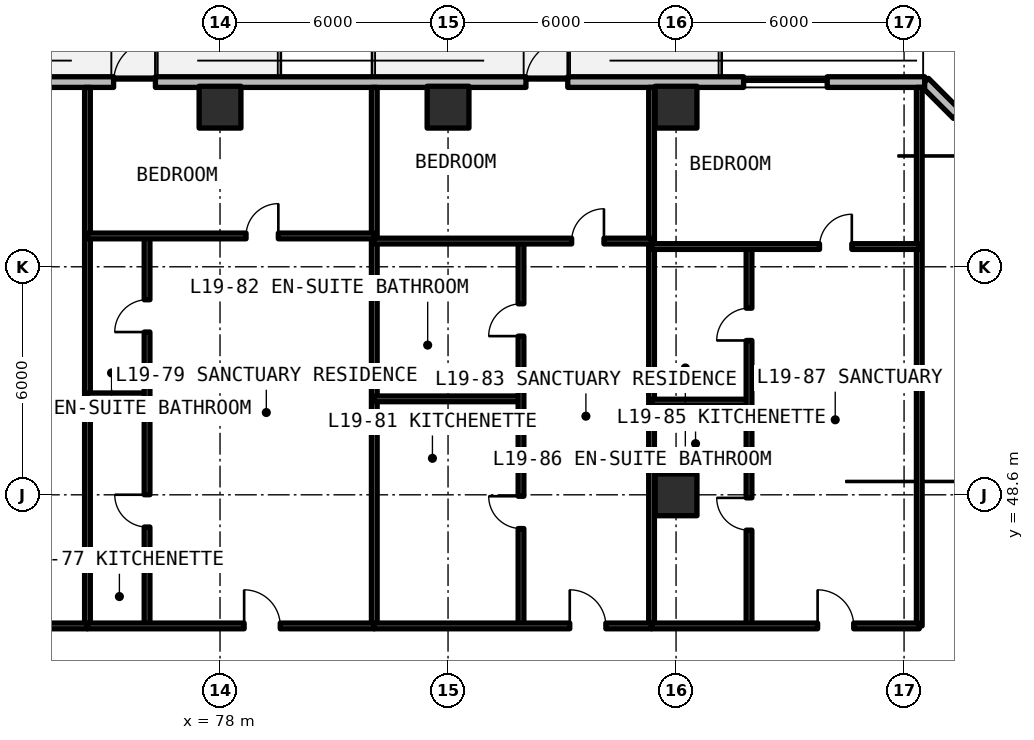
"""IFC4 building model, lengths in metres.
Left out: names, types, materials, properties, quantities, classifications, styles, units other than length and angle.
Written with IfcOpenShell. Run it as: python <this file> out.ifc"""

import sys

from ifc_helpers import new_model, si_unit, direction, frame, frame_2d, origin, origin_2d, place, context, subcontext, project, spatial, rectangle, extrude, element, fill, save


model = new_model("IFC4")
c1 = context("Model", 3, precision=1e-05, world=origin(), true_north=direction((0.0, 1.0)))
c2 = subcontext(c1, "Body", "Model", "MODEL_VIEW")
j1 = project(units=[si_unit("LENGTHUNIT", "METRE"), si_unit("PLANEANGLEUNIT", "RADIAN")], contexts=[c1])
p1 = place(None, origin())
s1 = spatial("IfcSite", under=j1, at=p1, CompositionType="ELEMENT")
p2 = place(p1, origin())
s2 = spatial("IfcBuilding", under=s1, at=p2, CompositionType="ELEMENT")
p3 = place(p2, frame((0.0, 0.0, 69.63)))
s3 = spatial("IfcBuildingStorey", under=s2, at=p3, CompositionType="ELEMENT", Elevation=69.63)
for number, where, z_axis, x_axis in (
    (1, (90.0, 48.6, 0.0), (0.0, 0.0, 1.0), (1.0, 0.0, 0.0)),
    (2, (78.0, 58.8, 0.0), (0.0, 0.0, 1.0), (1.0, 0.0, 0.0)),
    (3, (84.0, 58.8, 0.0), (0.0, 0.0, 1.0), (1.0, 0.0, 0.0)),
    (4, (90.0, 58.8, 0.0), (0.0, 0.0, 1.0), (1.0, 0.0, 0.0)),
):
    element("IfcColumn", number, at=place(p3, frame(where, z_axis=z_axis, x_axis=x_axis)), inside=s3, PredefinedType="COLUMN", context=c2, shape_type="SweptSolid", body=[
        extrude(rectangle(XDim=1.1, YDim=1.1, at=origin_2d()), origin(), (0.0, 0.0, 1.0), 3.63),
    ])
p4 = place(p3, frame((100.66, 55.342, 0.0), z_axis=(0.0, 0.0, 1.0), x_axis=(-0.707106781187, 0.707106781187, 0.0)))
e5 = element("IfcWall", 5, at=p4, inside=s3, PredefinedType="SOLIDWALL", context=c2, shape_type="SweptSolid", body=[
    extrude(rectangle(XDim=5.824, YDim=0.28, at=frame_2d((2.912, 0.0))), origin(), (0.0, 0.0, 1.0), 3.35),
])
p5 = place(p4, frame((1.212, 0.0, 0.78)))
e6 = element("IfcOpeningElement", 6, at=p5, cuts=e5, PredefinedType="OPENING", context=c2, shape_type="SweptSolid", body=[
    extrude(rectangle(XDim=3.4, YDim=1.66, at=frame_2d((1.7, 0.83))), frame((0.0, 0.15, 0.0), z_axis=(0.0, -1.0, 0.0), x_axis=(1.0, 0.0, 0.0)), (0.0, 0.0, 1.0), 0.3),
])
p6 = place(p3, frame((96.542, 59.46, 0.0), z_axis=(0.0, 0.0, 1.0), x_axis=(-1.0, 0.0, 0.0)))
e7 = element("IfcWall", 7, at=p6, inside=s3, PredefinedType="SOLIDWALL", context=c2, shape_type="SweptSolid", body=[
    extrude(rectangle(XDim=44.402, YDim=0.28, at=frame_2d((22.201, 0.0))), origin(), (0.0, 0.0, 1.0), 3.35),
])
p7 = place(p6, frame((32.592, 0.0, 0.0)))
e8 = element("IfcOpeningElement", 8, at=p7, cuts=e7, PredefinedType="OPENING", context=c2, shape_type="SweptSolid", body=[
    extrude(rectangle(XDim=1.1, YDim=2.15, at=frame_2d((0.55, 1.075))), frame((0.0, 0.15, 0.0), z_axis=(0.0, -1.0, 0.0), x_axis=(1.0, 0.0, 0.0)), (0.0, 0.0, 1.0), 0.3),
])
p8 = place(p6, frame((20.242, 0.0, 0.0)))
e9 = element("IfcOpeningElement", 9, at=p8, cuts=e7, PredefinedType="OPENING", context=c2, shape_type="SweptSolid", body=[
    extrude(rectangle(XDim=1.1, YDim=2.15, at=frame_2d((0.55, 1.075))), frame((0.0, 0.15, 0.0), z_axis=(0.0, -1.0, 0.0), x_axis=(1.0, 0.0, 0.0)), (0.0, 0.0, 1.0), 0.3),
])
p9 = place(p6, frame((9.392, 0.0, 0.0)))
e10 = element("IfcOpeningElement", 10, at=p9, cuts=e7, PredefinedType="OPENING", context=c2, shape_type="SweptSolid", body=[
    extrude(rectangle(XDim=1.1, YDim=2.15, at=frame_2d((0.55, 1.075))), frame((0.0, 0.15, 0.0), z_axis=(0.0, -1.0, 0.0), x_axis=(1.0, 0.0, 0.0)), (0.0, 0.0, 1.0), 0.3),
])
p10 = place(p6, frame((39.514, 0.0, 0.78)))
e11 = element("IfcOpeningElement", 11, at=p10, cuts=e7, PredefinedType="OPENING", context=c2, shape_type="SweptSolid", body=[
    extrude(rectangle(XDim=2.2, YDim=1.66, at=frame_2d((1.1, 0.83))), frame((0.0, 0.15, 0.0), z_axis=(0.0, -1.0, 0.0), x_axis=(1.0, 0.0, 0.0)), (0.0, 0.0, 1.0), 0.3),
])
p11 = place(p6, frame((25.379, 0.0, 0.78)))
e12 = element("IfcOpeningElement", 12, at=p11, cuts=e7, PredefinedType="OPENING", context=c2, shape_type="SweptSolid", body=[
    extrude(rectangle(XDim=2.2, YDim=1.66, at=frame_2d((1.1, 0.83))), frame((0.0, 0.15, 0.0), z_axis=(0.0, -1.0, 0.0), x_axis=(1.0, 0.0, 0.0)), (0.0, 0.0, 1.0), 0.3),
])
p12 = place(p6, frame((2.564, 0.0, 0.78)))
e13 = element("IfcOpeningElement", 13, at=p12, cuts=e7, PredefinedType="OPENING", context=c2, shape_type="SweptSolid", body=[
    extrude(rectangle(XDim=2.2, YDim=1.66, at=frame_2d((1.1, 0.83))), frame((0.0, 0.15, 0.0), z_axis=(0.0, -1.0, 0.0), x_axis=(1.0, 0.0, 0.0)), (0.0, 0.0, 1.0), 0.3),
])
for number, where, z_axis, x_axis in (
    (14, (96.4, 45.15, 0.0), (0.0, 0.0, 1.0), (0.0, 1.0, 0.0)),
    (15, (74.511, 45.15, 0.0), (0.0, 0.0, 1.0), (0.0, 1.0, 0.0)),
):
    element("IfcWall", number, at=place(p3, frame(where, z_axis=z_axis, x_axis=x_axis)), inside=s3, PredefinedType="SOLIDWALL", context=c2, shape_type="SweptSolid", body=[
        extrude(rectangle(XDim=14.17, YDim=0.15, at=frame_2d((7.085, 0.0))), origin(), (0.0, 0.0, 1.0), 2.57),
    ])
p13 = place(p3, frame((67.215, 45.15, 0.0), z_axis=(0.0, 0.0, 1.0), x_axis=(1.0, 0.0, 0.0)))
e16 = element("IfcWall", 16, at=p13, inside=s3, PredefinedType="SOLIDWALL", context=c2, shape_type="SweptSolid", body=[
    extrude(rectangle(XDim=7.296, YDim=0.15, at=frame_2d((3.648, 0.0))), origin(), (0.0, 0.0, 1.0), 2.57),
])
p14 = place(p13, frame((3.098, 0.0, 0.0)))
e17 = element("IfcOpeningElement", 17, at=p14, cuts=e16, PredefinedType="OPENING", context=c2, shape_type="SweptSolid", body=[
    extrude(rectangle(XDim=1.1, YDim=2.15, at=frame_2d((0.55, 1.075))), frame((0.0, 0.085, 0.0), z_axis=(0.0, -1.0, 0.0), x_axis=(1.0, 0.0, 0.0)), (0.0, 0.0, 1.0), 0.17),
])
p15 = place(p3, frame((82.059, 45.15, 0.0), z_axis=(0.0, 0.0, 1.0), x_axis=(0.0, 1.0, 0.0)))
e18 = element("IfcWall", 18, at=p15, inside=s3, PredefinedType="SOLIDWALL", context=c2, shape_type="SweptSolid", body=[
    extrude(rectangle(XDim=14.17, YDim=0.15, at=frame_2d((7.085, 0.0))), origin(), (0.0, 0.0, 1.0), 2.57),
])
p16 = place(p3, frame((74.511, 51.204, 0.0), z_axis=(0.0, 0.0, 1.0), x_axis=(1.0, 0.0, 0.0)))
e19 = element("IfcWall", 19, at=p16, inside=s3, PredefinedType="PARTITIONING", context=c2, shape_type="SweptSolid", body=[
    extrude(rectangle(XDim=1.569, YDim=0.15, at=frame_2d((0.784, 0.0))), origin(), (0.0, 0.0, 1.0), 2.57),
])
p17 = place(p3, frame((76.08, 45.15, 0.0), z_axis=(0.0, 0.0, 1.0), x_axis=(0.0, 1.0, 0.0)))
e20 = element("IfcWall", 20, at=p17, inside=s3, PredefinedType="PARTITIONING", context=c2, shape_type="SweptSolid", body=[
    extrude(rectangle(XDim=10.262, YDim=0.15, at=frame_2d((5.131, 0.0))), origin(), (0.0, 0.0, 1.0), 2.57),
])
p18 = place(p17, frame((2.602, 0.0, 0.0)))
e21 = element("IfcOpeningElement", 21, at=p18, cuts=e20, PredefinedType="OPENING", context=c2, shape_type="SweptSolid", body=[
    extrude(rectangle(XDim=0.85, YDim=2.1, at=frame_2d((0.425, 1.05))), frame((0.0, 0.085, 0.0), z_axis=(0.0, -1.0, 0.0), x_axis=(1.0, 0.0, 0.0)), (0.0, 0.0, 1.0), 0.17),
])
p19 = place(p17, frame((7.733, 0.0, 0.0)))
e22 = element("IfcOpeningElement", 22, at=p19, cuts=e20, PredefinedType="OPENING", context=c2, shape_type="SweptSolid", body=[
    extrude(rectangle(XDim=0.85, YDim=2.1, at=frame_2d((0.425, 1.05))), frame((0.0, 0.085, 0.0), z_axis=(0.0, -1.0, 0.0), x_axis=(1.0, 0.0, 0.0)), (0.0, 0.0, 1.0), 0.17),
])
p20 = place(p3, frame((74.511, 55.412, 0.0), z_axis=(0.0, 0.0, 1.0), x_axis=(1.0, 0.0, 0.0)))
e23 = element("IfcWall", 23, at=p20, inside=s3, PredefinedType="PARTITIONING", context=c2, shape_type="SweptSolid", body=[
    extrude(rectangle(XDim=7.548, YDim=0.15, at=frame_2d((3.774, 0.0))), origin(), (0.0, 0.0, 1.0), 2.57),
])
p21 = place(p20, frame((4.173, 0.0, 0.0)))
e24 = element("IfcOpeningElement", 24, at=p21, cuts=e23, PredefinedType="OPENING", context=c2, shape_type="SweptSolid", body=[
    extrude(rectangle(XDim=0.85, YDim=2.1, at=frame_2d((0.425, 1.05))), frame((0.0, 0.085, 0.0), z_axis=(0.0, -1.0, 0.0), x_axis=(1.0, 0.0, 0.0)), (0.0, 0.0, 1.0), 0.17),
])
p22 = place(p3, frame((74.511, 45.15, 0.0), z_axis=(0.0, 0.0, 1.0), x_axis=(1.0, 0.0, 0.0)))
e25 = element("IfcWall", 25, at=p22, inside=s3, PredefinedType="SOLIDWALL", context=c2, shape_type="SweptSolid", body=[
    extrude(rectangle(XDim=7.548, YDim=0.15, at=frame_2d((3.774, 0.0))), origin(), (0.0, 0.0, 1.0), 2.57),
])
p23 = place(p22, frame((4.123, 0.0, 0.0)))
e26 = element("IfcOpeningElement", 26, at=p23, cuts=e25, PredefinedType="OPENING", context=c2, shape_type="SweptSolid", body=[
    extrude(rectangle(XDim=0.95, YDim=2.15, at=frame_2d((0.475, 1.075))), frame((0.0, 0.085, 0.0), z_axis=(0.0, -1.0, 0.0), x_axis=(1.0, 0.0, 0.0)), (0.0, 0.0, 1.0), 0.17),
])
p24 = place(p3, frame((89.355, 45.15, 0.0), z_axis=(0.0, 0.0, 1.0), x_axis=(0.0, 1.0, 0.0)))
e27 = element("IfcWall", 27, at=p24, inside=s3, PredefinedType="SOLIDWALL", context=c2, shape_type="SweptSolid", body=[
    extrude(rectangle(XDim=14.17, YDim=0.15, at=frame_2d((7.085, 0.0))), origin(), (0.0, 0.0, 1.0), 2.57),
])
p25 = place(p3, frame((82.059, 51.125, 0.0), z_axis=(0.0, 0.0, 1.0), x_axis=(1.0, 0.0, 0.0)))
e28 = element("IfcWall", 28, at=p25, inside=s3, PredefinedType="PARTITIONING", context=c2, shape_type="SweptSolid", body=[
    extrude(rectangle(XDim=3.861, YDim=0.15, at=frame_2d((1.93, 0.0))), origin(), (0.0, 0.0, 1.0), 2.57),
])
p26 = place(p3, frame((85.92, 45.15, 0.0), z_axis=(0.0, 0.0, 1.0), x_axis=(0.0, 1.0, 0.0)))
e29 = element("IfcWall", 29, at=p26, inside=s3, PredefinedType="PARTITIONING", context=c2, shape_type="SweptSolid", body=[
    extrude(rectangle(XDim=10.127, YDim=0.15, at=frame_2d((5.063, 0.0))), origin(), (0.0, 0.0, 1.0), 2.57),
])
p27 = place(p26, frame((2.562, 0.0, 0.0)))
e30 = element("IfcOpeningElement", 30, at=p27, cuts=e29, PredefinedType="OPENING", context=c2, shape_type="SweptSolid", body=[
    extrude(rectangle(XDim=0.85, YDim=2.1, at=frame_2d((0.425, 1.05))), frame((0.0, 0.085, 0.0), z_axis=(0.0, -1.0, 0.0), x_axis=(1.0, 0.0, 0.0)), (0.0, 0.0, 1.0), 0.17),
])
p28 = place(p26, frame((7.626, 0.0, 0.0)))
e31 = element("IfcOpeningElement", 31, at=p28, cuts=e29, PredefinedType="OPENING", context=c2, shape_type="SweptSolid", body=[
    extrude(rectangle(XDim=0.85, YDim=2.1, at=frame_2d((0.425, 1.05))), frame((0.0, 0.085, 0.0), z_axis=(0.0, -1.0, 0.0), x_axis=(1.0, 0.0, 0.0)), (0.0, 0.0, 1.0), 0.17),
])
p29 = place(p3, frame((82.059, 55.277, 0.0), z_axis=(0.0, 0.0, 1.0), x_axis=(1.0, 0.0, 0.0)))
e32 = element("IfcWall", 32, at=p29, inside=s3, PredefinedType="PARTITIONING", context=c2, shape_type="SweptSolid", body=[
    extrude(rectangle(XDim=7.296, YDim=0.15, at=frame_2d((3.648, 0.0))), origin(), (0.0, 0.0, 1.0), 2.57),
])
p30 = place(p29, frame((5.194, 0.0, 0.0)))
e33 = element("IfcOpeningElement", 33, at=p30, cuts=e32, PredefinedType="OPENING", context=c2, shape_type="SweptSolid", body=[
    extrude(rectangle(XDim=0.85, YDim=2.1, at=frame_2d((0.425, 1.05))), frame((0.0, 0.085, 0.0), z_axis=(0.0, -1.0, 0.0), x_axis=(1.0, 0.0, 0.0)), (0.0, 0.0, 1.0), 0.17),
])
p31 = place(p3, frame((82.059, 45.15, 0.0), z_axis=(0.0, 0.0, 1.0), x_axis=(1.0, 0.0, 0.0)))
e34 = element("IfcWall", 34, at=p31, inside=s3, PredefinedType="SOLIDWALL", context=c2, shape_type="SweptSolid", body=[
    extrude(rectangle(XDim=7.296, YDim=0.15, at=frame_2d((3.648, 0.0))), origin(), (0.0, 0.0, 1.0), 2.57),
])
p32 = place(p31, frame((5.144, 0.0, 0.0)))
e35 = element("IfcOpeningElement", 35, at=p32, cuts=e34, PredefinedType="OPENING", context=c2, shape_type="SweptSolid", body=[
    extrude(rectangle(XDim=0.95, YDim=2.15, at=frame_2d((0.475, 1.075))), frame((0.0, 0.085, 0.0), z_axis=(0.0, -1.0, 0.0), x_axis=(1.0, 0.0, 0.0)), (0.0, 0.0, 1.0), 0.17),
])
p33 = place(p3, frame((89.355, 51.04, 0.0), z_axis=(0.0, 0.0, 1.0), x_axis=(1.0, 0.0, 0.0)))
e36 = element("IfcWall", 36, at=p33, inside=s3, PredefinedType="PARTITIONING", context=c2, shape_type="SweptSolid", body=[
    extrude(rectangle(XDim=2.565, YDim=0.15, at=frame_2d((1.282, 0.0))), origin(), (0.0, 0.0, 1.0), 2.57),
])
p34 = place(p3, frame((91.92, 45.15, 0.0), z_axis=(0.0, 0.0, 1.0), x_axis=(0.0, 1.0, 0.0)))
e37 = element("IfcWall", 37, at=p34, inside=s3, PredefinedType="PARTITIONING", context=c2, shape_type="SweptSolid", body=[
    extrude(rectangle(XDim=9.983, YDim=0.15, at=frame_2d((4.991, 0.0))), origin(), (0.0, 0.0, 1.0), 2.57),
])
p35 = place(p34, frame((2.52, 0.0, 0.0)))
e38 = element("IfcOpeningElement", 38, at=p35, cuts=e37, PredefinedType="OPENING", context=c2, shape_type="SweptSolid", body=[
    extrude(rectangle(XDim=0.85, YDim=2.1, at=frame_2d((0.425, 1.05))), frame((0.0, 0.085, 0.0), z_axis=(0.0, -1.0, 0.0), x_axis=(1.0, 0.0, 0.0)), (0.0, 0.0, 1.0), 0.17),
])
p36 = place(p34, frame((7.511, 0.0, 0.0)))
e39 = element("IfcOpeningElement", 39, at=p36, cuts=e37, PredefinedType="OPENING", context=c2, shape_type="SweptSolid", body=[
    extrude(rectangle(XDim=0.85, YDim=2.1, at=frame_2d((0.425, 1.05))), frame((0.0, 0.085, 0.0), z_axis=(0.0, -1.0, 0.0), x_axis=(1.0, 0.0, 0.0)), (0.0, 0.0, 1.0), 0.17),
])
p37 = place(p3, frame((89.355, 55.133, 0.0), z_axis=(0.0, 0.0, 1.0), x_axis=(1.0, 0.0, 0.0)))
e40 = element("IfcWall", 40, at=p37, inside=s3, PredefinedType="PARTITIONING", context=c2, shape_type="SweptSolid", body=[
    extrude(rectangle(XDim=7.045, YDim=0.15, at=frame_2d((3.522, 0.0))), origin(), (0.0, 0.0, 1.0), 2.57),
])
p38 = place(p37, frame((4.42, 0.0, 0.0)))
e41 = element("IfcOpeningElement", 41, at=p38, cuts=e40, PredefinedType="OPENING", context=c2, shape_type="SweptSolid", body=[
    extrude(rectangle(XDim=0.85, YDim=2.1, at=frame_2d((0.425, 1.05))), frame((0.0, 0.085, 0.0), z_axis=(0.0, -1.0, 0.0), x_axis=(1.0, 0.0, 0.0)), (0.0, 0.0, 1.0), 0.17),
])
p39 = place(p3, frame((89.355, 45.15, 0.0), z_axis=(0.0, 0.0, 1.0), x_axis=(1.0, 0.0, 0.0)))
e42 = element("IfcWall", 42, at=p39, inside=s3, PredefinedType="SOLIDWALL", context=c2, shape_type="SweptSolid", body=[
    extrude(rectangle(XDim=7.045, YDim=0.15, at=frame_2d((3.522, 0.0))), origin(), (0.0, 0.0, 1.0), 2.57),
])
p40 = place(p39, frame((4.37, 0.0, 0.0)))
e43 = element("IfcOpeningElement", 43, at=p40, cuts=e42, PredefinedType="OPENING", context=c2, shape_type="SweptSolid", body=[
    extrude(rectangle(XDim=0.95, YDim=2.15, at=frame_2d((0.475, 1.075))), frame((0.0, 0.085, 0.0), z_axis=(0.0, -1.0, 0.0), x_axis=(1.0, 0.0, 0.0)), (0.0, 0.0, 1.0), 0.17),
])
p41 = place(p8, frame((1.1, 0.0, 0.0), z_axis=(0.0, 0.0, 1.0), x_axis=(-1.0, 0.0, 0.0)))
e44 = element("IfcDoor", 44, at=p41, inside=s3, OperationType="SINGLE_SWING_LEFT", PredefinedType="DOOR", context=c2, shape_type="SweptSolid", body=[
    extrude(rectangle(XDim=1.1, YDim=2.15, at=frame_2d((0.55, 1.075))), frame((0.0, 0.025, 0.0), z_axis=(0.0, -1.0, 0.0), x_axis=(1.0, 0.0, 0.0)), (0.0, 0.0, 1.0), 0.05),
])
fill(e9, e44)
p42 = place(p9, frame((1.1, 0.0, 0.0), z_axis=(0.0, 0.0, 1.0), x_axis=(-1.0, 0.0, 0.0)))
e45 = element("IfcDoor", 45, at=p42, inside=s3, OperationType="SINGLE_SWING_RIGHT", PredefinedType="DOOR", context=c2, shape_type="SweptSolid", body=[
    extrude(rectangle(XDim=1.1, YDim=2.15, at=frame_2d((0.55, 1.075))), frame((0.0, 0.025, 0.0), z_axis=(0.0, -1.0, 0.0), x_axis=(1.0, 0.0, 0.0)), (0.0, 0.0, 1.0), 0.05),
])
fill(e10, e45)
p43 = place(p12, origin())
e46 = element("IfcWindow", 46, at=p43, inside=s3, PartitioningType="SINGLE_PANEL", PredefinedType="WINDOW", context=c2, shape_type="SweptSolid", body=[
    extrude(rectangle(XDim=2.2, YDim=1.66, at=frame_2d((1.1, 0.83))), frame((0.0, 0.03, 0.0), z_axis=(0.0, -1.0, 0.0), x_axis=(1.0, 0.0, 0.0)), (0.0, 0.0, 1.0), 0.06),
])
fill(e13, e46)
p44 = place(p18, origin())
e47 = element("IfcDoor", 47, at=p44, inside=s3, OperationType="SINGLE_SWING_RIGHT", PredefinedType="DOOR", context=c2, shape_type="SweptSolid", body=[
    extrude(rectangle(XDim=0.85, YDim=2.1, at=frame_2d((0.425, 1.05))), frame((0.0, 0.025, 0.0), z_axis=(0.0, -1.0, 0.0), x_axis=(1.0, 0.0, 0.0)), (0.0, 0.0, 1.0), 0.05),
])
fill(e21, e47)
p45 = place(p19, origin())
e48 = element("IfcDoor", 48, at=p45, inside=s3, OperationType="SINGLE_SWING_LEFT", PredefinedType="DOOR", context=c2, shape_type="SweptSolid", body=[
    extrude(rectangle(XDim=0.85, YDim=2.1, at=frame_2d((0.425, 1.05))), frame((0.0, 0.025, 0.0), z_axis=(0.0, -1.0, 0.0), x_axis=(1.0, 0.0, 0.0)), (0.0, 0.0, 1.0), 0.05),
])
fill(e22, e48)
p46 = place(p21, origin())
e49 = element("IfcDoor", 49, at=p46, inside=s3, OperationType="SINGLE_SWING_RIGHT", PredefinedType="DOOR", context=c2, shape_type="SweptSolid", body=[
    extrude(rectangle(XDim=0.85, YDim=2.1, at=frame_2d((0.425, 1.05))), frame((0.0, 0.025, 0.0), z_axis=(0.0, -1.0, 0.0), x_axis=(1.0, 0.0, 0.0)), (0.0, 0.0, 1.0), 0.05),
])
fill(e24, e49)
p47 = place(p23, origin())
e50 = element("IfcDoor", 50, at=p47, inside=s3, OperationType="SINGLE_SWING_LEFT", PredefinedType="DOOR", context=c2, shape_type="SweptSolid", body=[
    extrude(rectangle(XDim=0.95, YDim=2.15, at=frame_2d((0.475, 1.075))), frame((0.0, 0.025, 0.0), z_axis=(0.0, -1.0, 0.0), x_axis=(1.0, 0.0, 0.0)), (0.0, 0.0, 1.0), 0.05),
])
fill(e26, e50)
p48 = place(p27, origin())
e51 = element("IfcDoor", 51, at=p48, inside=s3, OperationType="SINGLE_SWING_RIGHT", PredefinedType="DOOR", context=c2, shape_type="SweptSolid", body=[
    extrude(rectangle(XDim=0.85, YDim=2.1, at=frame_2d((0.425, 1.05))), frame((0.0, 0.025, 0.0), z_axis=(0.0, -1.0, 0.0), x_axis=(1.0, 0.0, 0.0)), (0.0, 0.0, 1.0), 0.05),
])
fill(e30, e51)
p49 = place(p28, origin())
e52 = element("IfcDoor", 52, at=p49, inside=s3, OperationType="SINGLE_SWING_LEFT", PredefinedType="DOOR", context=c2, shape_type="SweptSolid", body=[
    extrude(rectangle(XDim=0.85, YDim=2.1, at=frame_2d((0.425, 1.05))), frame((0.0, 0.025, 0.0), z_axis=(0.0, -1.0, 0.0), x_axis=(1.0, 0.0, 0.0)), (0.0, 0.0, 1.0), 0.05),
])
fill(e31, e52)
p50 = place(p30, origin())
e53 = element("IfcDoor", 53, at=p50, inside=s3, OperationType="SINGLE_SWING_RIGHT", PredefinedType="DOOR", context=c2, shape_type="SweptSolid", body=[
    extrude(rectangle(XDim=0.85, YDim=2.1, at=frame_2d((0.425, 1.05))), frame((0.0, 0.025, 0.0), z_axis=(0.0, -1.0, 0.0), x_axis=(1.0, 0.0, 0.0)), (0.0, 0.0, 1.0), 0.05),
])
fill(e33, e53)
p51 = place(p32, origin())
e54 = element("IfcDoor", 54, at=p51, inside=s3, OperationType="SINGLE_SWING_LEFT", PredefinedType="DOOR", context=c2, shape_type="SweptSolid", body=[
    extrude(rectangle(XDim=0.95, YDim=2.15, at=frame_2d((0.475, 1.075))), frame((0.0, 0.025, 0.0), z_axis=(0.0, -1.0, 0.0), x_axis=(1.0, 0.0, 0.0)), (0.0, 0.0, 1.0), 0.05),
])
fill(e35, e54)
p52 = place(p35, origin())
e55 = element("IfcDoor", 55, at=p52, inside=s3, OperationType="SINGLE_SWING_RIGHT", PredefinedType="DOOR", context=c2, shape_type="SweptSolid", body=[
    extrude(rectangle(XDim=0.85, YDim=2.1, at=frame_2d((0.425, 1.05))), frame((0.0, 0.025, 0.0), z_axis=(0.0, -1.0, 0.0), x_axis=(1.0, 0.0, 0.0)), (0.0, 0.0, 1.0), 0.05),
])
fill(e38, e55)
p53 = place(p36, origin())
e56 = element("IfcDoor", 56, at=p53, inside=s3, OperationType="SINGLE_SWING_LEFT", PredefinedType="DOOR", context=c2, shape_type="SweptSolid", body=[
    extrude(rectangle(XDim=0.85, YDim=2.1, at=frame_2d((0.425, 1.05))), frame((0.0, 0.025, 0.0), z_axis=(0.0, -1.0, 0.0), x_axis=(1.0, 0.0, 0.0)), (0.0, 0.0, 1.0), 0.05),
])
fill(e39, e56)
p54 = place(p38, origin())
e57 = element("IfcDoor", 57, at=p54, inside=s3, OperationType="SINGLE_SWING_RIGHT", PredefinedType="DOOR", context=c2, shape_type="SweptSolid", body=[
    extrude(rectangle(XDim=0.85, YDim=2.1, at=frame_2d((0.425, 1.05))), frame((0.0, 0.025, 0.0), z_axis=(0.0, -1.0, 0.0), x_axis=(1.0, 0.0, 0.0)), (0.0, 0.0, 1.0), 0.05),
])
fill(e41, e57)
p55 = place(p40, origin())
e58 = element("IfcDoor", 58, at=p55, inside=s3, OperationType="SINGLE_SWING_LEFT", PredefinedType="DOOR", context=c2, shape_type="SweptSolid", body=[
    extrude(rectangle(XDim=0.95, YDim=2.15, at=frame_2d((0.475, 1.075))), frame((0.0, 0.025, 0.0), z_axis=(0.0, -1.0, 0.0), x_axis=(1.0, 0.0, 0.0)), (0.0, 0.0, 1.0), 0.05),
])
fill(e43, e58)
save(model, sys.argv[1])
